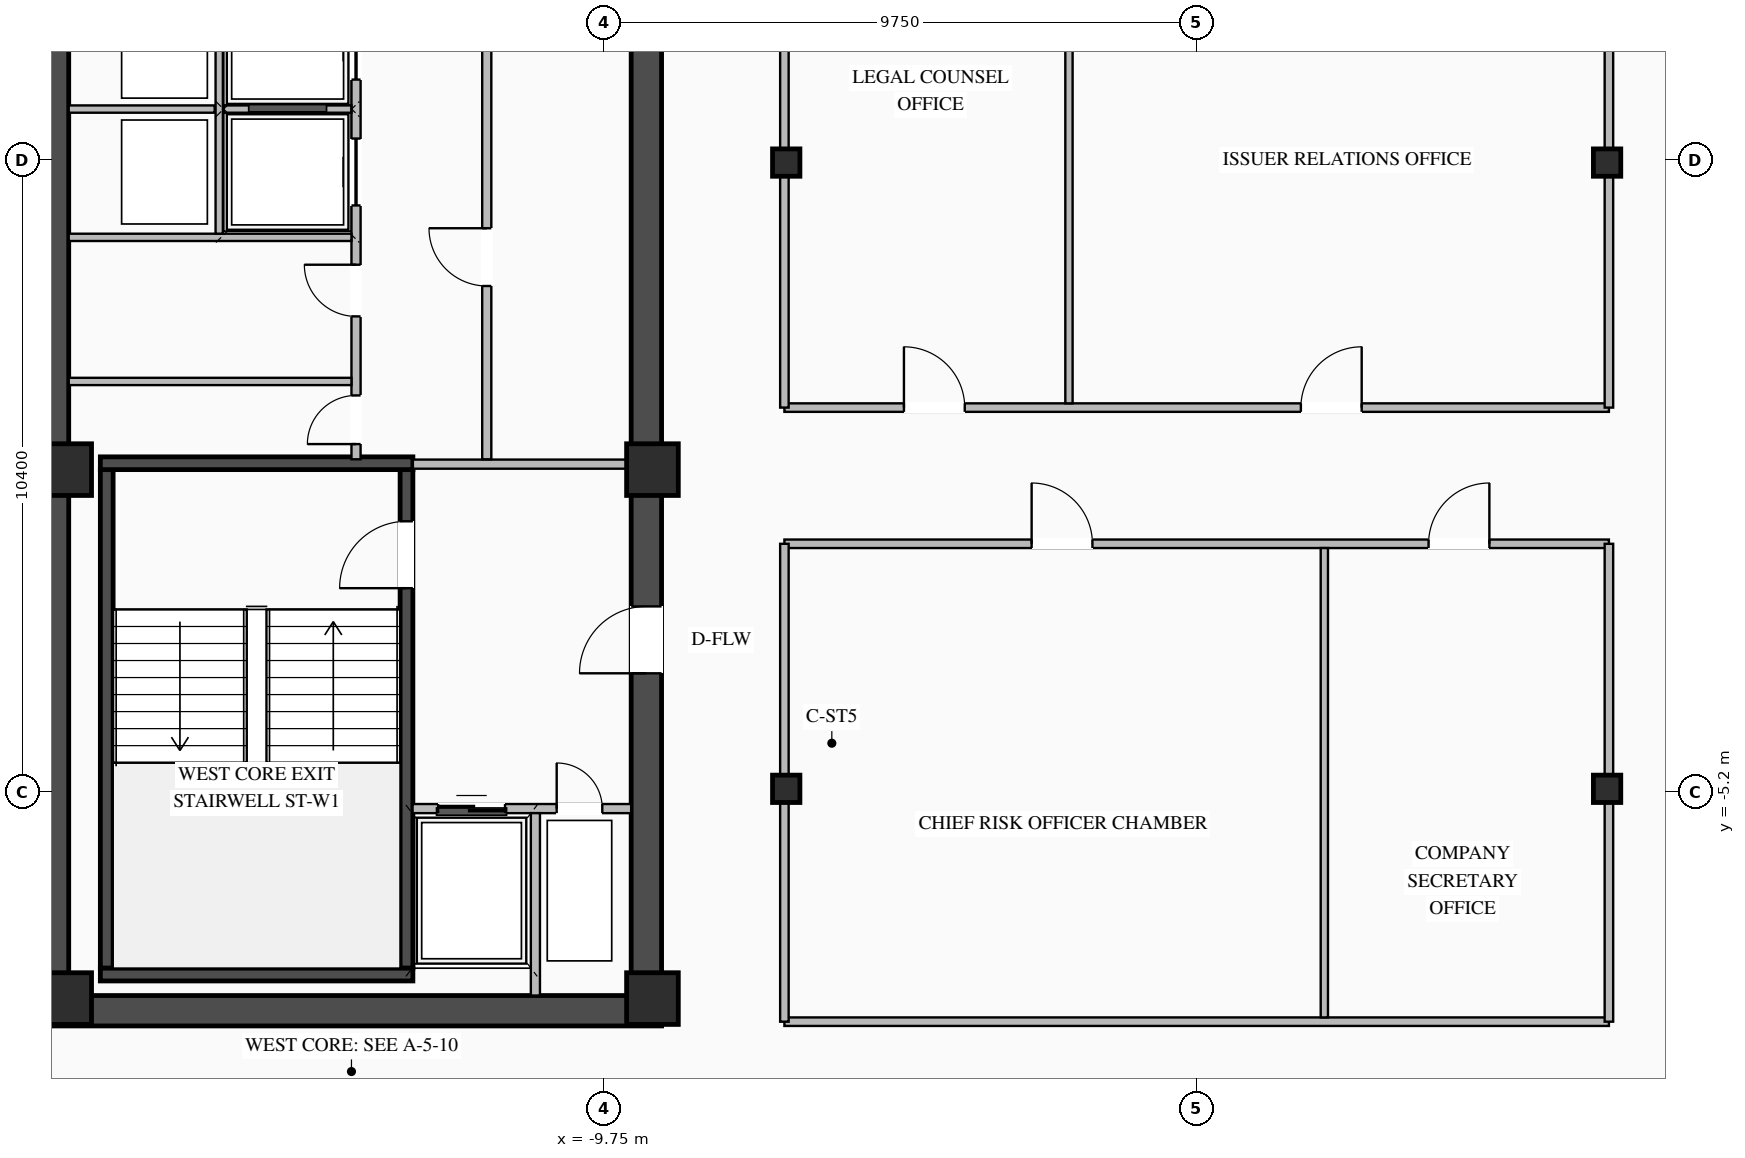
"""IFC4 building model, lengths in metres.
Left out: names, types, materials, properties, quantities, classifications, styles, units other than length and angle.
Written with IfcOpenShell. Run it as: python <this file> out.ifc"""

import sys

from ifc_helpers import new_model, si_unit, direction, frame, frame_2d, origin, origin_2d, place, context, subcontext, project, spatial, rectangle, i_section, extrude, element, fill, save


model = new_model("IFC4")
c1 = context("Model", 3, precision=1e-05, world=origin(), true_north=direction((0.0, 1.0)))
c2 = subcontext(c1, "Body", "Model", "MODEL_VIEW")
j1 = project(units=[si_unit("LENGTHUNIT", "METRE"), si_unit("PLANEANGLEUNIT", "RADIAN")], contexts=[c1])
p1 = place(None, origin())
s1 = spatial("IfcSite", under=j1, at=p1, CompositionType="ELEMENT")
p2 = place(p1, origin())
s2 = spatial("IfcBuilding", under=s1, at=p2, CompositionType="ELEMENT")
p3 = place(p2, frame((0.0, 0.0, 251.7)))
s3 = spatial("IfcBuildingStorey", under=s2, at=p3, CompositionType="ELEMENT", Elevation=251.7)
p4 = place(p3, frame((-19.05, -8.8, 0.0), z_axis=(0.0, 0.0, 1.0), x_axis=(1.0, 0.0, 0.0)))
e1 = element("IfcWall", 1, at=p4, inside=s3, PredefinedType="SHEAR", context=c2, shape_type="SweptSolid", body=[
    extrude(rectangle(XDim=10.25, YDim=0.5, at=frame_2d((5.125, 0.0))), origin(), (0.0, 0.0, 1.0), 3.27),
])
p5 = place(p3, frame((-18.8, -8.55, 0.0), z_axis=(0.0, 0.0, 1.0), x_axis=(0.0, 1.0, 0.0)))
e2 = element("IfcWall", 2, at=p5, inside=s3, PredefinedType="SHEAR", context=c2, shape_type="SweptSolid", body=[
    extrude(rectangle(XDim=17.1, YDim=0.5, at=frame_2d((8.55, 0.0))), origin(), (0.0, 0.0, 1.0), 3.27),
])
p6 = place(p3, frame((-9.05, -8.55, 0.0), z_axis=(0.0, 0.0, 1.0), x_axis=(0.0, 1.0, 0.0)))
e3 = element("IfcWall", 3, at=p6, inside=s3, PredefinedType="SHEAR", context=c2, shape_type="SweptSolid", body=[
    extrude(rectangle(XDim=17.1, YDim=0.5, at=frame_2d((8.55, 0.0))), origin(), (0.0, 0.0, 1.0), 3.27),
])
p7 = place(p6, frame((5.3, 0.0, 0.0)))
e4 = element("IfcOpeningElement", 4, at=p7, cuts=e3, PredefinedType="OPENING", context=c2, shape_type="SweptSolid", body=[
    extrude(rectangle(XDim=1.1, YDim=2.08, at=frame_2d((0.55, 1.04))), frame((0.0, 0.26, 0.0), z_axis=(0.0, -1.0, 0.0), x_axis=(1.0, 0.0, 0.0)), (0.0, 0.0, 1.0), 0.52),
])
p8 = place(p3, frame((-12.995, -8.1, 0.0), z_axis=(0.0, 0.0, 1.0), x_axis=(0.0, 1.0, 0.0)))
e5 = element("IfcWall", 5, at=p8, inside=s3, PredefinedType="SHEAR", context=c2, shape_type="SweptSolid", body=[
    extrude(rectangle(XDim=8.2, YDim=0.21, at=frame_2d((4.1, 0.0))), origin(), (0.0, 0.0, 1.0), 3.27),
])
p9 = place(p8, frame((6.25, 0.0, 0.0)))
e6 = element("IfcOpeningElement", 6, at=p9, cuts=e5, PredefinedType="OPENING", context=c2, shape_type="SweptSolid", body=[
    extrude(rectangle(XDim=1.1, YDim=2.15, at=frame_2d((0.55, 1.075))), frame((0.0, 0.115, 0.0), z_axis=(0.0, -1.0, 0.0), x_axis=(1.0, 0.0, 0.0)), (0.0, 0.0, 1.0), 0.23),
])
p10 = place(p3, frame((-17.925, -8.1, 0.0), z_axis=(0.0, 0.0, 1.0), x_axis=(0.0, 1.0, 0.0)))
e7 = element("IfcWall", 7, at=p10, inside=s3, PredefinedType="SHEAR", context=c2, shape_type="SweptSolid", body=[
    extrude(rectangle(XDim=8.2, YDim=0.21, at=frame_2d((4.1, 0.0))), origin(), (0.0, 0.0, 1.0), 3.27),
])
for number, where, z_axis, x_axis in (
    (8, (-18.03, -8.205, 0.0), (0.0, 0.0, 1.0), (1.0, 0.0, 0.0)),
    (9, (-12.89, 0.205, 0.0), (0.0, 0.0, 1.0), (-1.0, 0.0, 0.0)),
):
    element("IfcWall", number, at=place(p3, frame(where, z_axis=z_axis, x_axis=x_axis)), inside=s3, PredefinedType="SHEAR", context=c2, shape_type="SweptSolid", body=[
        extrude(rectangle(XDim=5.14, YDim=0.21, at=frame_2d((2.57, 0.0))), origin(), (0.0, 0.0, 1.0), 3.27),
    ])
for number, where, z_axis, x_axis in (
    (10, (-8.95, -8.6, 0.0), (0.0, 0.0, 1.0), (1.0, 0.0, 0.0)),
    (11, (-8.95, 0.1, 0.0), (0.0, 0.0, 1.0), (1.0, 0.0, 0.0)),
    (12, (-18.6, -8.6, 0.0), (0.0, 0.0, 1.0), (1.0, 0.0, 0.0)),
    (13, (-18.6, 0.1, 0.0), (0.0, 0.0, 1.0), (1.0, 0.0, 0.0)),
):
    element("IfcColumn", number, at=place(p3, frame(where, z_axis=z_axis, x_axis=x_axis)), inside=s3, PredefinedType="COLUMN", context=c2, shape_type="SweptSolid", body=[
        extrude(rectangle(XDim=0.85, YDim=0.85, at=origin_2d()), origin(), (0.0, 0.0, 1.0), 3.45),
    ])
for number, where, z_axis, x_axis in (
    (14, (-6.75, -5.15, 0.0), (0.0, 0.0, 1.0), (1.0, 0.0, 0.0)),
    (15, (-6.75, 5.15, 0.0), (0.0, 0.0, 1.0), (1.0, 0.0, 0.0)),
    (16, (6.75, -5.15, 0.0), (0.0, 0.0, 1.0), (1.0, 0.0, 0.0)),
    (17, (6.75, 5.15, 0.0), (0.0, 0.0, 1.0), (1.0, 0.0, 0.0)),
):
    element("IfcColumn", number, at=place(p3, frame(where, z_axis=z_axis, x_axis=x_axis)), inside=s3, PredefinedType="COLUMN", context=c2, shape_type="SweptSolid", body=[
        extrude(i_section(OverallWidth=0.45, OverallDepth=0.45, WebThickness=0.022, FlangeThickness=0.032, at=origin_2d()), origin(), (0.0, 0.0, 1.0), 3.45),
    ])
p11 = place(p3, frame((-12.895, -5.475, 0.0), z_axis=(0.0, 0.0, 1.0), x_axis=(1.0, 0.0, 0.0)))
e18 = element("IfcWall", 18, at=p11, inside=s3, PredefinedType="STANDARD", context=c2, shape_type="SweptSolid", body=[
    extrude(rectangle(XDim=3.595, YDim=0.15, at=frame_2d((1.797, 0.0))), origin(), (0.0, 0.0, 1.0), 3.25),
])
p12 = place(p11, frame((0.42, 0.0, 0.0)))
e19 = element("IfcOpeningElement", 19, at=p12, cuts=e18, PredefinedType="OPENING", context=c2, shape_type="SweptSolid", body=[
    extrude(rectangle(XDim=1.1, YDim=2.15, at=frame_2d((0.55, 1.075))), frame((0.0, 0.085, 0.0), z_axis=(0.0, -1.0, 0.0), x_axis=(1.0, 0.0, 0.0)), (0.0, 0.0, 1.0), 0.17),
])
p13 = place(p11, frame((2.37, 0.0, 0.0)))
e20 = element("IfcOpeningElement", 20, at=p13, cuts=e18, PredefinedType="OPENING", context=c2, shape_type="SweptSolid", body=[
    extrude(rectangle(XDim=0.75, YDim=2.05, at=frame_2d((0.375, 1.025))), frame((0.0, 0.085, 0.0), z_axis=(0.0, -1.0, 0.0), x_axis=(1.0, 0.0, 0.0)), (0.0, 0.0, 1.0), 0.17),
])
p14 = place(p3, frame((-10.875, -8.55, 0.0), z_axis=(0.0, 0.0, 1.0), x_axis=(0.0, 1.0, 0.0)))
e21 = element("IfcWall", 21, at=p14, inside=s3, PredefinedType="STANDARD", context=c2, shape_type="SweptSolid", body=[
    extrude(rectangle(XDim=3.0, YDim=0.15, at=frame_2d((1.5, 0.0))), origin(), (0.0, 0.0, 1.0), 3.25),
])
p15 = place(p3, frame((-12.89, 0.19, 0.0), z_axis=(0.0, 0.0, 1.0), x_axis=(1.0, 0.0, 0.0)))
e22 = element("IfcWall", 22, at=p15, inside=s3, PredefinedType="STANDARD", context=c2, shape_type="SweptSolid", body=[
    extrude(rectangle(XDim=3.59, YDim=0.15, at=frame_2d((1.795, 0.0))), origin(), (0.0, 0.0, 1.0), 2.645),
])
p16 = place(p3, frame((-11.675, 0.27, 0.0), z_axis=(0.0, 0.0, 1.0), x_axis=(0.0, 1.0, 0.0)))
e23 = element("IfcWall", 23, at=p16, inside=s3, PredefinedType="STANDARD", context=c2, shape_type="SweptSolid", body=[
    extrude(rectangle(XDim=8.28, YDim=0.15, at=frame_2d((4.14, 0.0))), origin(), (0.0, 0.0, 1.0), 3.25),
])
p17 = place(p16, frame((2.85, 0.0, 0.0)))
e24 = element("IfcOpeningElement", 24, at=p17, cuts=e23, PredefinedType="OPENING", context=c2, shape_type="SweptSolid", body=[
    extrude(rectangle(XDim=0.95, YDim=2.05, at=frame_2d((0.475, 1.025))), frame((0.0, 0.085, 0.0), z_axis=(0.0, -1.0, 0.0), x_axis=(1.0, 0.0, 0.0)), (0.0, 0.0, 1.0), 0.17),
])
p18 = place(p3, frame((-13.825, 0.27, 0.0), z_axis=(0.0, 0.0, 1.0), x_axis=(0.0, 1.0, 0.0)))
e25 = element("IfcWall", 25, at=p18, inside=s3, PredefinedType="STANDARD", context=c2, shape_type="SweptSolid", body=[
    extrude(rectangle(XDim=8.28, YDim=0.15, at=frame_2d((4.14, 0.0))), origin(), (0.0, 0.0, 1.0), 3.25),
])
p19 = place(p18, frame((4.175, 0.0, 0.0)))
e26 = element("IfcOpeningElement", 26, at=p19, cuts=e25, PredefinedType="OPENING", context=c2, shape_type="SweptSolid", body=[
    extrude(rectangle(XDim=1.1, YDim=2.1, at=frame_2d((0.55, 1.05))), frame((0.0, 0.085, 0.0), z_axis=(0.0, -1.0, 0.0), x_axis=(1.0, 0.0, 0.0)), (0.0, 0.0, 1.0), 0.17),
])
p20 = place(p18, frame((6.245, 0.0, 0.0)))
e27 = element("IfcOpeningElement", 27, at=p20, cuts=e25, PredefinedType="OPENING", context=c2, shape_type="SweptSolid", body=[
    extrude(rectangle(XDim=1.1, YDim=2.1, at=frame_2d((0.55, 1.05))), frame((0.0, 0.085, 0.0), z_axis=(0.0, -1.0, 0.0), x_axis=(1.0, 0.0, 0.0)), (0.0, 0.0, 1.0), 0.17),
])
p21 = place(p18, frame((0.25, 0.0, 0.0)))
e28 = element("IfcOpeningElement", 28, at=p21, cuts=e25, PredefinedType="OPENING", context=c2, shape_type="SweptSolid", body=[
    extrude(rectangle(XDim=0.8, YDim=2.05, at=frame_2d((0.4, 1.025))), frame((0.0, 0.085, 0.0), z_axis=(0.0, -1.0, 0.0), x_axis=(1.0, 0.0, 0.0)), (0.0, 0.0, 1.0), 0.17),
])
p22 = place(p18, frame((2.35, 0.0, 0.0)))
e29 = element("IfcOpeningElement", 29, at=p22, cuts=e25, PredefinedType="OPENING", context=c2, shape_type="SweptSolid", body=[
    extrude(rectangle(XDim=0.85, YDim=2.05, at=frame_2d((0.425, 1.025))), frame((0.0, 0.085, 0.0), z_axis=(0.0, -1.0, 0.0), x_axis=(1.0, 0.0, 0.0)), (0.0, 0.0, 1.0), 0.17),
])
p23 = place(p3, frame((-18.55, 3.92, 0.0), z_axis=(0.0, 0.0, 1.0), x_axis=(1.0, 0.0, 0.0)))
e30 = element("IfcWall", 30, at=p23, inside=s3, PredefinedType="STANDARD", context=c2, shape_type="SweptSolid", body=[
    extrude(rectangle(XDim=4.65, YDim=0.12, at=frame_2d((2.325, 0.0))), origin(), (0.0, 0.0, 1.0), 3.25),
])
p24 = place(p3, frame((-18.55, 6.03, 0.0), z_axis=(0.0, 0.0, 1.0), x_axis=(1.0, 0.0, 0.0)))
e31 = element("IfcWall", 31, at=p24, inside=s3, PredefinedType="STANDARD", context=c2, shape_type="SweptSolid", body=[
    extrude(rectangle(XDim=2.4, YDim=0.12, at=frame_2d((1.2, 0.0))), origin(), (0.0, 0.0, 1.0), 3.25),
])
p25 = place(p3, frame((-16.075, 3.98, 0.0), z_axis=(0.0, 0.0, 1.0), x_axis=(0.0, 1.0, 0.0)))
e32 = element("IfcWall", 32, at=p25, inside=s3, PredefinedType="STANDARD", context=c2, shape_type="SweptSolid", body=[
    extrude(rectangle(XDim=4.57, YDim=0.12, at=frame_2d((2.285, 0.0))), origin(), (0.0, 0.0, 1.0), 3.25),
])
p26 = place(p3, frame((-16.0, 6.03, 0.0), z_axis=(0.0, 0.0, 1.0), x_axis=(1.0, 0.0, 0.0)))
e33 = element("IfcWall", 33, at=p26, inside=s3, PredefinedType="STANDARD", context=c2, shape_type="SweptSolid", body=[
    extrude(rectangle(XDim=2.1, YDim=0.12, at=frame_2d((1.05, 0.0))), origin(), (0.0, 0.0, 1.0), 3.25),
])
p27 = place(p3, frame((-18.55, 1.55, 0.0), z_axis=(0.0, 0.0, 1.0), x_axis=(1.0, 0.0, 0.0)))
e34 = element("IfcWall", 34, at=p27, inside=s3, PredefinedType="STANDARD", context=c2, shape_type="SweptSolid", body=[
    extrude(rectangle(XDim=4.65, YDim=0.12, at=frame_2d((2.325, 0.0))), origin(), (0.0, 0.0, 1.0), 3.25),
])
p28 = place(p3, frame((-6.78, 1.12, 0.0), z_axis=(0.0, 0.0, 1.0), x_axis=(1.0, 0.0, 0.0)))
e35 = element("IfcWall", 35, at=p28, inside=s3, PredefinedType="STANDARD", context=c2, shape_type="SweptSolid", body=[
    extrude(rectangle(XDim=13.56, YDim=0.14, at=frame_2d((6.78, 0.0))), origin(), (0.0, 0.0, 1.0), 3.25),
])
p29 = place(p28, frame((1.966, 0.0, 0.0)))
e36 = element("IfcOpeningElement", 36, at=p29, cuts=e35, PredefinedType="OPENING", context=c2, shape_type="SweptSolid", body=[
    extrude(rectangle(XDim=1.0, YDim=2.08, at=frame_2d((0.5, 1.04))), frame((0.0, 0.08, 0.0), z_axis=(0.0, -1.0, 0.0), x_axis=(1.0, 0.0, 0.0)), (0.0, 0.0, 1.0), 0.16),
])
p30 = place(p28, frame((8.494, 0.0, 0.0)))
e37 = element("IfcOpeningElement", 37, at=p30, cuts=e35, PredefinedType="OPENING", context=c2, shape_type="SweptSolid", body=[
    extrude(rectangle(XDim=1.0, YDim=2.08, at=frame_2d((0.5, 1.04))), frame((0.0, 0.08, 0.0), z_axis=(0.0, -1.0, 0.0), x_axis=(1.0, 0.0, 0.0)), (0.0, 0.0, 1.0), 0.16),
])
for number, where, z_axis, x_axis in (
    (38, (-6.78, 1.12, 0.0), (0.0, 0.0, 1.0), (0.0, 1.0, 0.0)),
    (39, (6.78, 1.12, 0.0), (0.0, 0.0, 1.0), (0.0, 1.0, 0.0)),
):
    element("IfcWall", number, at=place(p3, frame(where, z_axis=z_axis, x_axis=x_axis)), inside=s3, PredefinedType="STANDARD", context=c2, shape_type="SweptSolid", body=[
        extrude(rectangle(XDim=7.86, YDim=0.14, at=frame_2d((3.93, 0.0))), origin(), (0.0, 0.0, 1.0), 2.645),
    ])
p31 = place(p3, frame((-2.1, 1.19, 0.0), z_axis=(0.0, 0.0, 1.0), x_axis=(0.0, 1.0, 0.0)))
e40 = element("IfcWall", 40, at=p31, inside=s3, PredefinedType="STANDARD", context=c2, shape_type="SweptSolid", body=[
    extrude(rectangle(XDim=7.72, YDim=0.12, at=frame_2d((3.86, 0.0))), origin(), (0.0, 0.0, 1.0), 3.25),
])
p32 = place(p3, frame((-6.78, -1.12, 0.0), z_axis=(0.0, 0.0, 1.0), x_axis=(1.0, 0.0, 0.0)))
e41 = element("IfcWall", 41, at=p32, inside=s3, PredefinedType="STANDARD", context=c2, shape_type="SweptSolid", body=[
    extrude(rectangle(XDim=13.56, YDim=0.14, at=frame_2d((6.78, 0.0))), origin(), (0.0, 0.0, 1.0), 3.25),
])
p33 = place(p32, frame((4.066, 0.0, 0.0)))
e42 = element("IfcOpeningElement", 42, at=p33, cuts=e41, PredefinedType="OPENING", context=c2, shape_type="SweptSolid", body=[
    extrude(rectangle(XDim=1.0, YDim=2.08, at=frame_2d((0.5, 1.04))), frame((0.0, 0.08, 0.0), z_axis=(0.0, -1.0, 0.0), x_axis=(1.0, 0.0, 0.0)), (0.0, 0.0, 1.0), 0.16),
])
p34 = place(p32, frame((10.594, 0.0, 0.0)))
e43 = element("IfcOpeningElement", 43, at=p34, cuts=e41, PredefinedType="OPENING", context=c2, shape_type="SweptSolid", body=[
    extrude(rectangle(XDim=1.0, YDim=2.08, at=frame_2d((0.5, 1.04))), frame((0.0, 0.08, 0.0), z_axis=(0.0, -1.0, 0.0), x_axis=(1.0, 0.0, 0.0)), (0.0, 0.0, 1.0), 0.16),
])
p35 = place(p3, frame((-6.78, -8.98, 0.0), z_axis=(0.0, 0.0, 1.0), x_axis=(1.0, 0.0, 0.0)))
e44 = element("IfcWall", 44, at=p35, inside=s3, PredefinedType="STANDARD", context=c2, shape_type="SweptSolid", body=[
    extrude(rectangle(XDim=13.56, YDim=0.14, at=frame_2d((6.78, 0.0))), origin(), (0.0, 0.0, 1.0), 3.25),
])
for number, where, z_axis, x_axis in (
    (45, (-6.78, -8.98, 0.0), (0.0, 0.0, 1.0), (0.0, 1.0, 0.0)),
    (46, (6.78, -8.98, 0.0), (0.0, 0.0, 1.0), (0.0, 1.0, 0.0)),
):
    element("IfcWall", number, at=place(p3, frame(where, z_axis=z_axis, x_axis=x_axis)), inside=s3, PredefinedType="STANDARD", context=c2, shape_type="SweptSolid", body=[
        extrude(rectangle(XDim=7.86, YDim=0.14, at=frame_2d((3.93, 0.0))), origin(), (0.0, 0.0, 1.0), 2.645),
    ])
p36 = place(p3, frame((2.1, -8.91, 0.0), z_axis=(0.0, 0.0, 1.0), x_axis=(0.0, 1.0, 0.0)))
e47 = element("IfcWall", 47, at=p36, inside=s3, PredefinedType="STANDARD", context=c2, shape_type="SweptSolid", body=[
    extrude(rectangle(XDim=7.72, YDim=0.12, at=frame_2d((3.86, 0.0))), origin(), (0.0, 0.0, 1.0), 3.25),
])
p37 = place(p9, origin())
e48 = element("IfcDoor", 48, at=p37, inside=s3, OperationType="SINGLE_SWING_LEFT", PredefinedType="DOOR", context=c2, shape_type="SweptSolid", body=[
    extrude(rectangle(XDim=1.1, YDim=2.15, at=frame_2d((0.55, 1.075))), frame((0.0, 0.025, 0.0), z_axis=(0.0, -1.0, 0.0), x_axis=(1.0, 0.0, 0.0)), (0.0, 0.0, 1.0), 0.05),
])
fill(e6, e48)
p38 = place(p12, origin())
e49 = element("IfcDoor", 49, at=p38, inside=s3, OperationType="DOUBLE_DOOR_SLIDING", PredefinedType="DOOR", context=c2, shape_type="SweptSolid", body=[
    extrude(rectangle(XDim=1.1, YDim=2.15, at=frame_2d((0.55, 1.075))), frame((0.0, 0.025, 0.0), z_axis=(0.0, -1.0, 0.0), x_axis=(1.0, 0.0, 0.0)), (0.0, 0.0, 1.0), 0.05),
])
fill(e19, e49)
p39 = place(p13, origin())
e50 = element("IfcDoor", 50, at=p39, inside=s3, OperationType="SINGLE_SWING_LEFT", PredefinedType="DOOR", context=c2, shape_type="SweptSolid", body=[
    extrude(rectangle(XDim=0.75, YDim=2.05, at=frame_2d((0.375, 1.025))), frame((0.0, 0.025, 0.0), z_axis=(0.0, -1.0, 0.0), x_axis=(1.0, 0.0, 0.0)), (0.0, 0.0, 1.0), 0.05),
])
fill(e20, e50)
p40 = place(p7, origin())
e51 = element("IfcDoor", 51, at=p40, inside=s3, OperationType="SINGLE_SWING_LEFT", PredefinedType="DOOR", context=c2, shape_type="SweptSolid", body=[
    extrude(rectangle(XDim=1.1, YDim=2.08, at=frame_2d((0.55, 1.04))), frame((0.0, 0.205, 0.0), z_axis=(0.0, -1.0, 0.0), x_axis=(1.0, 0.0, 0.0)), (0.0, 0.0, 1.0), 0.05),
])
fill(e4, e51)
p41 = place(p17, origin())
e52 = element("IfcDoor", 52, at=p41, inside=s3, OperationType="SINGLE_SWING_RIGHT", PredefinedType="DOOR", context=c2, shape_type="SweptSolid", body=[
    extrude(rectangle(XDim=0.95, YDim=2.05, at=frame_2d((0.475, 1.025))), frame((0.0, 0.025, 0.0), z_axis=(0.0, -1.0, 0.0), x_axis=(1.0, 0.0, 0.0)), (0.0, 0.0, 1.0), 0.05),
])
fill(e24, e52)
p42 = place(p19, origin())
e53 = element("IfcDoor", 53, at=p42, inside=s3, OperationType="DOUBLE_DOOR_SLIDING", PredefinedType="DOOR", context=c2, shape_type="SweptSolid", body=[
    extrude(rectangle(XDim=1.1, YDim=2.1, at=frame_2d((0.55, 1.05))), frame((0.0, 0.025, 0.0), z_axis=(0.0, -1.0, 0.0), x_axis=(1.0, 0.0, 0.0)), (0.0, 0.0, 1.0), 0.05),
])
fill(e26, e53)
p43 = place(p20, origin())
e54 = element("IfcDoor", 54, at=p43, inside=s3, OperationType="DOUBLE_DOOR_SLIDING", PredefinedType="DOOR", context=c2, shape_type="SweptSolid", body=[
    extrude(rectangle(XDim=1.1, YDim=2.1, at=frame_2d((0.55, 1.05))), frame((0.0, 0.025, 0.0), z_axis=(0.0, -1.0, 0.0), x_axis=(1.0, 0.0, 0.0)), (0.0, 0.0, 1.0), 0.05),
])
fill(e27, e54)
p44 = place(p21, origin())
e55 = element("IfcDoor", 55, at=p44, inside=s3, OperationType="SINGLE_SWING_LEFT", PredefinedType="DOOR", context=c2, shape_type="SweptSolid", body=[
    extrude(rectangle(XDim=0.8, YDim=2.05, at=frame_2d((0.4, 1.025))), frame((0.0, 0.025, 0.0), z_axis=(0.0, -1.0, 0.0), x_axis=(1.0, 0.0, 0.0)), (0.0, 0.0, 1.0), 0.05),
])
fill(e28, e55)
p45 = place(p22, origin())
e56 = element("IfcDoor", 56, at=p45, inside=s3, OperationType="SINGLE_SWING_RIGHT", PredefinedType="DOOR", context=c2, shape_type="SweptSolid", body=[
    extrude(rectangle(XDim=0.85, YDim=2.05, at=frame_2d((0.425, 1.025))), frame((0.0, 0.025, 0.0), z_axis=(0.0, -1.0, 0.0), x_axis=(1.0, 0.0, 0.0)), (0.0, 0.0, 1.0), 0.05),
])
fill(e29, e56)
p46 = place(p29, origin())
e57 = element("IfcDoor", 57, at=p46, inside=s3, OperationType="SINGLE_SWING_LEFT", PredefinedType="DOOR", context=c2, shape_type="SweptSolid", body=[
    extrude(rectangle(XDim=1.0, YDim=2.08, at=frame_2d((0.5, 1.04))), frame((0.0, 0.025, 0.0), z_axis=(0.0, -1.0, 0.0), x_axis=(1.0, 0.0, 0.0)), (0.0, 0.0, 1.0), 0.05),
])
fill(e36, e57)
p47 = place(p30, origin())
e58 = element("IfcDoor", 58, at=p47, inside=s3, OperationType="SINGLE_SWING_RIGHT", PredefinedType="DOOR", context=c2, shape_type="SweptSolid", body=[
    extrude(rectangle(XDim=1.0, YDim=2.08, at=frame_2d((0.5, 1.04))), frame((0.0, 0.025, 0.0), z_axis=(0.0, -1.0, 0.0), x_axis=(1.0, 0.0, 0.0)), (0.0, 0.0, 1.0), 0.05),
])
fill(e37, e58)
p48 = place(p33, origin())
e59 = element("IfcDoor", 59, at=p48, inside=s3, OperationType="SINGLE_SWING_LEFT", PredefinedType="DOOR", context=c2, shape_type="SweptSolid", body=[
    extrude(rectangle(XDim=1.0, YDim=2.08, at=frame_2d((0.5, 1.04))), frame((0.0, 0.025, 0.0), z_axis=(0.0, -1.0, 0.0), x_axis=(1.0, 0.0, 0.0)), (0.0, 0.0, 1.0), 0.05),
])
fill(e42, e59)
p49 = place(p34, origin())
e60 = element("IfcDoor", 60, at=p49, inside=s3, OperationType="SINGLE_SWING_RIGHT", PredefinedType="DOOR", context=c2, shape_type="SweptSolid", body=[
    extrude(rectangle(XDim=1.0, YDim=2.08, at=frame_2d((0.5, 1.04))), frame((0.0, 0.025, 0.0), z_axis=(0.0, -1.0, 0.0), x_axis=(1.0, 0.0, 0.0)), (0.0, 0.0, 1.0), 0.05),
])
fill(e43, e60)
save(model, sys.argv[1])
